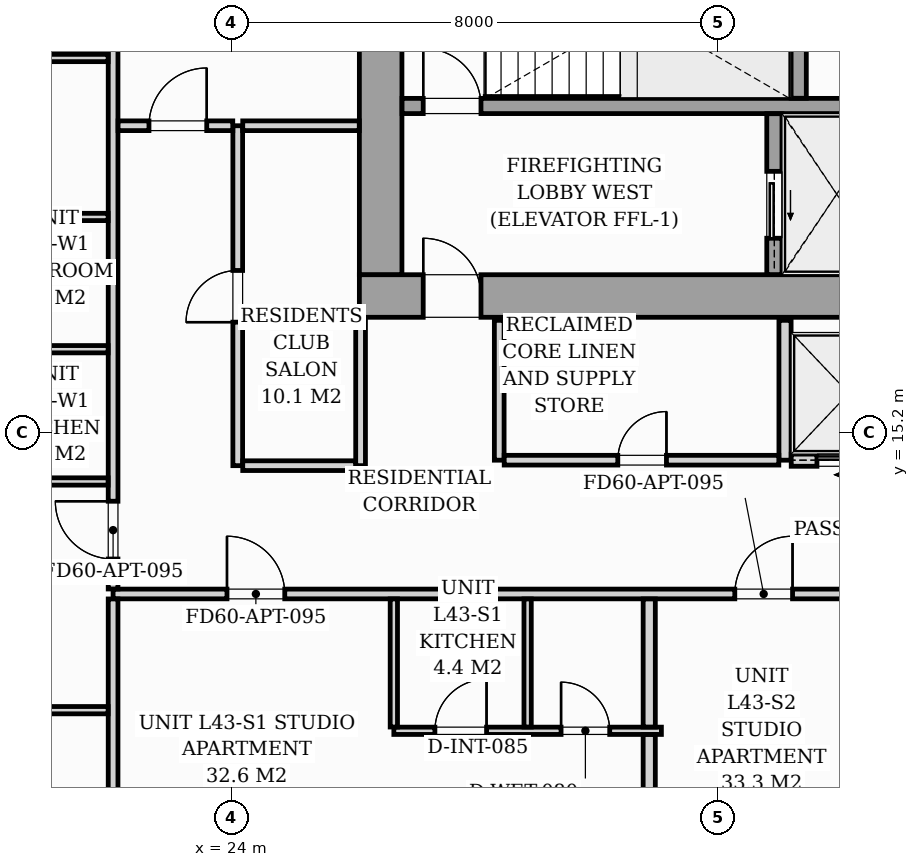
"""IFC4 building model, lengths in metres.
Left out: names, types, materials, properties, quantities, classifications, styles, units other than length and angle.
Written with IfcOpenShell. Run it as: python <this file> out.ifc"""

import sys

from ifc_helpers import new_model, si_unit, direction, frame, frame_2d, origin, origin_2d, place, context, subcontext, project, spatial, rectangle, i_section, extrude, source, transform, mapped, element, fill, save


model = new_model("IFC4")
c1 = context("Model", 3, precision=1e-05, world=origin(), true_north=direction((0.0, 1.0)))
c2 = subcontext(c1, "Body", "Model", "MODEL_VIEW")
j1 = project(units=[si_unit("LENGTHUNIT", "METRE"), si_unit("PLANEANGLEUNIT", "RADIAN")], contexts=[c1])
p1 = place(None, origin())
s1 = spatial("IfcSite", under=j1, at=p1, CompositionType="ELEMENT")
p2 = place(p1, origin())
s2 = spatial("IfcBuilding", under=s1, at=p2, CompositionType="ELEMENT")
p3 = place(p2, frame((0.0, 0.0, 150.2)))
s3 = spatial("IfcBuildingStorey", under=s2, at=p3, CompositionType="ELEMENT", Elevation=150.2)
m1 = source(origin(), c2, "Body", "SweptSolid", [
    extrude(i_section(OverallWidth=0.421, OverallDepth=0.465, WebThickness=0.045, FlangeThickness=0.073, FilletRadius=0.018, at=origin_2d()), origin(), (0.0, 0.0, 1.0), 3.196),
])
for number, where, z_axis, x_axis in (
    (1, (26.4, 17.4, 0.002), (0.0, 0.0, 1.0), (1.0, 0.0, 0.0)),
    (2, (33.12, 17.4, 0.002), (0.0, 0.0, 1.0), (1.0, 0.0, 0.0)),
):
    element("IfcColumn", number, at=place(p3, frame(where, z_axis=z_axis, x_axis=x_axis)), inside=s3, PredefinedType="PILASTER", context=c2, shape_type="MappedRepresentation", body=[
        mapped(m1, transform((0.0, 0.0, 0.0), scale=1.0)),
    ])
p4 = place(p3, frame((24.617, 7.873, 0.0), z_axis=(0.0, 0.0, 1.0), x_axis=(-0.995395976631, 0.095848055311, 0.0)))
e3 = element("IfcWall", 3, at=p4, inside=s3, PredefinedType="STANDARD", context=c2, shape_type="SweptSolid", body=[
    extrude(rectangle(XDim=17.01, YDim=0.26, at=frame_2d((8.505, 0.0))), origin(), (0.0, 0.0, 1.0), 2.94),
])
p5 = place(p4, frame((6.65, 0.0, 0.0)))
e4 = element("IfcOpeningElement", 4, at=p5, cuts=e3, PredefinedType="OPENING", context=c2, shape_type="SweptSolid", body=[
    extrude(rectangle(XDim=1.8, YDim=2.06, at=frame_2d((0.9, 1.03))), frame((0.0, 0.14, 0.0), z_axis=(0.0, -1.0, 0.0), x_axis=(1.0, 0.0, 0.0)), (0.0, 0.0, 1.0), 0.28),
])
p6 = place(p4, frame((9.25, 0.0, 0.65)))
e5 = element("IfcOpeningElement", 5, at=p6, cuts=e3, PredefinedType="OPENING", context=c2, shape_type="SweptSolid", body=[
    extrude(rectangle(XDim=1.6, YDim=1.5, at=frame_2d((0.8, 0.75))), frame((0.0, 0.14, 0.0), z_axis=(0.0, -1.0, 0.0), x_axis=(1.0, 0.0, 0.0)), (0.0, 0.0, 1.0), 0.28),
])
p7 = place(p3, frame((26.1, 17.45, 0.0), z_axis=(0.0, 0.0, 1.0), x_axis=(1.0, 0.0, 0.0)))
e6 = element("IfcWall", 6, at=p7, inside=s3, PredefinedType="SHEAR", context=c2, shape_type="SweptSolid", body=[
    extrude(rectangle(XDim=19.8, YDim=0.7, at=frame_2d((9.9, 0.0))), origin(), (0.0, 0.0, 1.0), 3.2),
])
p8 = place(p7, frame((1.05, 0.0, 0.0)))
e7 = element("IfcOpeningElement", 7, at=p8, cuts=e6, PredefinedType="OPENING", context=c2, shape_type="SweptSolid", body=[
    extrude(rectangle(XDim=0.95, YDim=2.06, at=frame_2d((0.475, 1.03))), frame((0.0, 0.36, 0.0), z_axis=(0.0, -1.0, 0.0), x_axis=(1.0, 0.0, 0.0)), (0.0, 0.0, 1.0), 0.72),
])
p9 = place(p7, frame((9.48, 0.0, 0.0)))
e8 = element("IfcOpeningElement", 8, at=p9, cuts=e6, PredefinedType="OPENING", context=c2, shape_type="SweptSolid", body=[
    extrude(rectangle(XDim=0.85, YDim=2.0, at=frame_2d((0.425, 1.0))), frame((0.0, 0.36, 0.0), z_axis=(0.0, -1.0, 0.0), x_axis=(1.0, 0.0, 0.0)), (0.0, 0.0, 1.0), 0.72),
])
p10 = place(p7, frame((17.65, 0.0, 0.0)))
e9 = element("IfcOpeningElement", 9, at=p10, cuts=e6, PredefinedType="OPENING", context=c2, shape_type="SweptSolid", body=[
    extrude(rectangle(XDim=0.95, YDim=2.06, at=frame_2d((0.475, 1.03))), frame((0.0, 0.36, 0.0), z_axis=(0.0, -1.0, 0.0), x_axis=(1.0, 0.0, 0.0)), (0.0, 0.0, 1.0), 0.72),
])
p11 = place(p3, frame((26.45, 17.802, 0.0), z_axis=(0.0, 0.0, 1.0), x_axis=(0.0, 1.0, 0.0)))
e10 = element("IfcWall", 10, at=p11, inside=s3, PredefinedType="SHEAR", context=c2, shape_type="SweptSolid", body=[
    extrude(rectangle(XDim=5.796, YDim=0.7, at=frame_2d((2.898, 0.0))), origin(), (0.0, 0.0, 1.0), 3.2),
])
p12 = place(p3, frame((26.802, 20.575, 0.0), z_axis=(0.0, 0.0, 1.0), x_axis=(1.0, 0.0, 0.0)))
e11 = element("IfcWall", 11, at=p12, inside=s3, PredefinedType="SOLIDWALL", context=c2, shape_type="SweptSolid", body=[
    extrude(rectangle(XDim=8.148, YDim=0.25, at=frame_2d((4.074, 0.0))), origin(), (0.0, 0.0, 1.0), 3.2),
])
p13 = place(p12, frame((0.348, 0.0, 0.0)))
e12 = element("IfcOpeningElement", 12, at=p13, cuts=e11, PredefinedType="OPENING", context=c2, shape_type="SweptSolid", body=[
    extrude(rectangle(XDim=0.95, YDim=2.06, at=frame_2d((0.475, 1.03))), frame((0.0, 0.135, 0.0), z_axis=(0.0, -1.0, 0.0), x_axis=(1.0, 0.0, 0.0)), (0.0, 0.0, 1.0), 0.27),
])
p14 = place(p3, frame((33.325, 20.702, 0.0), z_axis=(0.0, 0.0, 1.0), x_axis=(0.0, 1.0, 0.0)))
e13 = element("IfcWall", 13, at=p14, inside=s3, PredefinedType="SOLIDWALL", context=c2, shape_type="SweptSolid", body=[
    extrude(rectangle(XDim=2.896, YDim=0.25, at=frame_2d((1.448, 0.0))), origin(), (0.0, 0.0, 1.0), 3.2),
])
p15 = place(p3, frame((32.925, 17.802, 0.0), z_axis=(0.0, 0.0, 1.0), x_axis=(0.0, 1.0, 0.0)))
e14 = element("IfcWall", 14, at=p15, inside=s3, PredefinedType="SOLIDWALL", context=c2, shape_type="SweptSolid", body=[
    extrude(rectangle(XDim=2.646, YDim=0.25, at=frame_2d((1.323, 0.0))), origin(), (0.0, 0.0, 1.0), 3.2),
])
p16 = place(p15, frame((0.598, 0.0, 0.0)))
e15 = element("IfcOpeningElement", 15, at=p16, cuts=e14, PredefinedType="OPENING", context=c2, shape_type="SweptSolid", body=[
    extrude(rectangle(XDim=1.1, YDim=2.08, at=frame_2d((0.55, 1.04))), frame((0.0, 0.135, 0.0), z_axis=(0.0, -1.0, 0.0), x_axis=(1.0, 0.0, 0.0)), (0.0, 0.0, 1.0), 0.27),
])
p17 = place(p3, frame((28.4, 14.75, 0.0), z_axis=(0.0, 0.0, 1.0), x_axis=(0.0, 1.0, 0.0)))
e16 = element("IfcWall", 16, at=p17, inside=s3, PredefinedType="PARTITIONING", context=c2, shape_type="SweptSolid", body=[
    extrude(rectangle(XDim=2.3, YDim=0.16, at=frame_2d((1.15, 0.0))), origin(), (0.0, 0.0, 1.0), 2.94),
])
p18 = place(p3, frame((33.1, 14.75, 0.0), z_axis=(0.0, 0.0, 1.0), x_axis=(0.0, 1.0, 0.0)))
e17 = element("IfcWall", 17, at=p18, inside=s3, PredefinedType="PARTITIONING", context=c2, shape_type="SweptSolid", body=[
    extrude(rectangle(XDim=2.3, YDim=0.2, at=frame_2d((1.15, 0.0))), origin(), (0.0, 0.0, 1.0), 2.94),
])
p19 = place(p3, frame((28.482, 14.75, 0.0), z_axis=(0.0, 0.0, 1.0), x_axis=(1.0, 0.0, 0.0)))
e18 = element("IfcWall", 18, at=p19, inside=s3, PredefinedType="PARTITIONING", context=c2, shape_type="SweptSolid", body=[
    extrude(rectangle(XDim=4.516, YDim=0.16, at=frame_2d((2.258, 0.0))), origin(), (0.0, 0.0, 1.0), 2.94),
])
p20 = place(p19, frame((1.868, 0.0, 0.0)))
e19 = element("IfcOpeningElement", 19, at=p20, cuts=e18, PredefinedType="OPENING", context=c2, shape_type="SweptSolid", body=[
    extrude(rectangle(XDim=0.8, YDim=2.05, at=frame_2d((0.4, 1.025))), frame((0.0, 0.09, 0.0), z_axis=(0.0, -1.0, 0.0), x_axis=(1.0, 0.0, 0.0)), (0.0, 0.0, 1.0), 0.18),
])
p21 = place(p3, frame((33.202, 14.75, 0.0), z_axis=(0.0, 0.0, 1.0), x_axis=(1.0, 0.0, 0.0)))
e20 = element("IfcWall", 20, at=p21, inside=s3, PredefinedType="PARTITIONING", context=c2, shape_type="SweptSolid", body=[
    extrude(rectangle(XDim=1.896, YDim=0.2, at=frame_2d((0.948, 0.0))), origin(), (0.0, 0.0, 1.0), 2.94),
])
p22 = place(p21, frame((0.423, 0.0, 0.0)))
e21 = element("IfcOpeningElement", 21, at=p22, cuts=e20, PredefinedType="OPENING", context=c2, shape_type="SweptSolid", body=[
    extrude(rectangle(XDim=1.05, YDim=2.08, at=frame_2d((0.525, 1.04))), frame((0.0, 0.11, 0.0), z_axis=(0.0, -1.0, 0.0), x_axis=(1.0, 0.0, 0.0)), (0.0, 0.0, 1.0), 0.22),
])
p23 = place(p3, frame((22.05, 12.55, 0.0), z_axis=(0.0, 0.0, 1.0), x_axis=(1.0, 0.0, 0.0)))
e22 = element("IfcWall", 22, at=p23, inside=s3, PredefinedType="PARTITIONING", context=c2, shape_type="SweptSolid", body=[
    extrude(rectangle(XDim=23.83, YDim=0.16, at=frame_2d((11.915, 0.0))), origin(), (0.0, 0.0, 1.0), 2.94),
])
p24 = place(p23, frame((1.873, 0.0, 0.0)))
e23 = element("IfcOpeningElement", 23, at=p24, cuts=e22, PredefinedType="OPENING", context=c2, shape_type="SweptSolid", body=[
    extrude(rectangle(XDim=0.95, YDim=2.06, at=frame_2d((0.475, 1.03))), frame((0.0, 0.09, 0.0), z_axis=(0.0, -1.0, 0.0), x_axis=(1.0, 0.0, 0.0)), (0.0, 0.0, 1.0), 0.18),
])
p25 = place(p23, frame((10.224, 0.0, 0.0)))
e24 = element("IfcOpeningElement", 24, at=p25, cuts=e22, PredefinedType="OPENING", context=c2, shape_type="SweptSolid", body=[
    extrude(rectangle(XDim=0.95, YDim=2.06, at=frame_2d((0.475, 1.03))), frame((0.0, 0.09, 0.0), z_axis=(0.0, -1.0, 0.0), x_axis=(1.0, 0.0, 0.0)), (0.0, 0.0, 1.0), 0.18),
])
p26 = place(p23, frame((21.84, 0.0, 0.0)))
e25 = element("IfcOpeningElement", 25, at=p26, cuts=e22, PredefinedType="OPENING", context=c2, shape_type="SweptSolid", body=[
    extrude(rectangle(XDim=0.95, YDim=2.06, at=frame_2d((0.475, 1.03))), frame((0.0, 0.09, 0.0), z_axis=(0.0, -1.0, 0.0), x_axis=(1.0, 0.0, 0.0)), (0.0, 0.0, 1.0), 0.18),
])
p27 = place(p3, frame((22.05, 8.253, 0.0), z_axis=(0.0, 0.0, 1.0), x_axis=(0.0, 1.0, 0.0)))
e26 = element("IfcWall", 26, at=p27, inside=s3, PredefinedType="PARTITIONING", context=c2, shape_type="SweptSolid", body=[
    extrude(rectangle(XDim=4.215, YDim=0.16, at=frame_2d((2.107, 0.0))), origin(), (0.0, 0.0, 1.0), 2.94),
])
p28 = place(p3, frame((22.05, 12.632, 0.0), z_axis=(0.0, 0.0, 1.0), x_axis=(0.0, 1.0, 0.0)))
e27 = element("IfcWall", 27, at=p28, inside=s3, PredefinedType="PARTITIONING", context=c2, shape_type="SweptSolid", body=[
    extrude(rectangle(XDim=14.785, YDim=0.16, at=frame_2d((7.393, 0.0))), origin(), (0.0, 0.0, 1.0), 2.94),
])
p29 = place(p28, frame((0.493, 0.0, 0.0)))
e28 = element("IfcOpeningElement", 28, at=p29, cuts=e27, PredefinedType="OPENING", context=c2, shape_type="SweptSolid", body=[
    extrude(rectangle(XDim=0.95, YDim=2.06, at=frame_2d((0.475, 1.03))), frame((0.0, 0.09, 0.0), z_axis=(0.0, -1.0, 0.0), x_axis=(1.0, 0.0, 0.0)), (0.0, 0.0, 1.0), 0.18),
])
p30 = place(p3, frame((26.667, 10.3, 0.0), z_axis=(0.0, 0.0, 1.0), x_axis=(1.0, 0.0, 0.0)))
e29 = element("IfcWall", 29, at=p30, inside=s3, PredefinedType="PARTITIONING", context=c2, shape_type="SweptSolid", body=[
    extrude(rectangle(XDim=4.4, YDim=0.12, at=frame_2d((2.2, 0.0))), origin(), (0.0, 0.0, 1.0), 2.94),
])
p31 = place(p30, frame((0.675, 0.0, 0.0)))
e30 = element("IfcOpeningElement", 30, at=p31, cuts=e29, PredefinedType="OPENING", context=c2, shape_type="SweptSolid", body=[
    extrude(rectangle(XDim=0.85, YDim=2.05, at=frame_2d((0.425, 1.025))), frame((0.0, 0.07, 0.0), z_axis=(0.0, -1.0, 0.0), x_axis=(1.0, 0.0, 0.0)), (0.0, 0.0, 1.0), 0.14),
])
p32 = place(p30, frame((2.75, 0.0, 0.0)))
e31 = element("IfcOpeningElement", 31, at=p32, cuts=e29, PredefinedType="OPENING", context=c2, shape_type="SweptSolid", body=[
    extrude(rectangle(XDim=0.8, YDim=2.02, at=frame_2d((0.4, 1.01))), frame((0.0, 0.07, 0.0), z_axis=(0.0, -1.0, 0.0), x_axis=(1.0, 0.0, 0.0)), (0.0, 0.0, 1.0), 0.14),
])
for number, where, z_axis, x_axis in (
    (32, (26.667, 10.362, 0.0), (0.0, 0.0, 1.0), (0.0, 1.0, 0.0)),
    (33, (28.867, 10.362, 0.0), (0.0, 0.0, 1.0), (0.0, 1.0, 0.0)),
):
    element("IfcWall", number, at=place(p3, frame(where, z_axis=z_axis, x_axis=x_axis)), inside=s3, PredefinedType="PARTITIONING", context=c2, shape_type="SweptSolid", body=[
        extrude(rectangle(XDim=2.106, YDim=0.12, at=frame_2d((1.053, 0.0))), origin(), (0.0, 0.0, 1.0), 2.94),
    ])
p33 = place(p3, frame((30.867, 7.221, 0.0), z_axis=(0.0, 0.0, 1.0), x_axis=(0.0, 1.0, 0.0)))
e34 = element("IfcWall", 34, at=p33, inside=s3, PredefinedType="PARTITIONING", context=c2, shape_type="SweptSolid", body=[
    extrude(rectangle(XDim=3.017, YDim=0.2, at=frame_2d((1.508, 0.0))), origin(), (0.0, 0.0, 1.0), 2.94),
])
p34 = place(p3, frame((30.867, 10.362, 0.0), z_axis=(0.0, 0.0, 1.0), x_axis=(0.0, 1.0, 0.0)))
e35 = element("IfcWall", 35, at=p34, inside=s3, PredefinedType="PARTITIONING", context=c2, shape_type="SweptSolid", body=[
    extrude(rectangle(XDim=2.106, YDim=0.2, at=frame_2d((1.053, 0.0))), origin(), (0.0, 0.0, 1.0), 2.94),
])
for number, where, z_axis, x_axis in (
    (36, (19.712, 16.575, 0.0), (0.0, 0.0, 1.0), (1.0, 0.0, 0.0)),
    (37, (19.712, 14.4, 0.0), (0.0, 0.0, 1.0), (1.0, 0.0, 0.0)),
    (38, (19.712, 18.75, 0.0), (0.0, 0.0, 1.0), (1.0, 0.0, 0.0)),
):
    element("IfcWall", number, at=place(p3, frame(where, z_axis=z_axis, x_axis=x_axis)), inside=s3, PredefinedType="PARTITIONING", context=c2, shape_type="SweptSolid", body=[
        extrude(rectangle(XDim=2.256, YDim=0.12, at=frame_2d((1.128, 0.0))), origin(), (0.0, 0.0, 1.0), 2.94),
    ])
p35 = place(p3, frame((6.396, 21.364, 0.0), z_axis=(0.0, 0.0, 1.0), x_axis=(1.0, 0.0, 0.0)))
e39 = element("IfcWall", 39, at=p35, inside=s3, PredefinedType="PARTITIONING", context=c2, shape_type="SweptSolid", body=[
    extrude(rectangle(XDim=15.572, YDim=0.12, at=frame_2d((7.786, 0.0))), origin(), (0.0, 0.0, 1.0), 2.94),
])
p36 = place(p35, frame((9.45, 0.0, 0.0)))
e40 = element("IfcOpeningElement", 40, at=p36, cuts=e39, PredefinedType="OPENING", context=c2, shape_type="SweptSolid", body=[
    extrude(rectangle(XDim=0.85, YDim=2.05, at=frame_2d((0.425, 1.025))), frame((0.0, 0.07, 0.0), z_axis=(0.0, -1.0, 0.0), x_axis=(1.0, 0.0, 0.0)), (0.0, 0.0, 1.0), 0.14),
])
p37 = place(p3, frame((8.395, 10.639, 0.0), z_axis=(0.0, 0.0, 1.0), x_axis=(1.0, 0.0, 0.0)))
e41 = element("IfcWall", 41, at=p37, inside=s3, PredefinedType="PARTITIONING", context=c2, shape_type="SweptSolid", body=[
    extrude(rectangle(XDim=13.573, YDim=0.12, at=frame_2d((6.787, 0.0))), origin(), (0.0, 0.0, 1.0), 2.94),
])
p38 = place(p37, frame((7.451, 0.0, 0.0)))
e42 = element("IfcOpeningElement", 42, at=p38, cuts=e41, PredefinedType="OPENING", context=c2, shape_type="SweptSolid", body=[
    extrude(rectangle(XDim=0.85, YDim=2.05, at=frame_2d((0.425, 1.025))), frame((0.0, 0.07, 0.0), z_axis=(0.0, -1.0, 0.0), x_axis=(1.0, 0.0, 0.0)), (0.0, 0.0, 1.0), 0.14),
])
p39 = place(p3, frame((24.1, 14.66, 0.0), z_axis=(0.0, 0.0, 1.0), x_axis=(0.0, 1.0, 0.0)))
e43 = element("IfcWall", 43, at=p39, inside=s3, PredefinedType="PARTITIONING", context=c2, shape_type="SweptSolid", body=[
    extrude(rectangle(XDim=5.59, YDim=0.16, at=frame_2d((2.795, 0.0))), origin(), (0.0, 0.0, 1.0), 2.94),
])
p40 = place(p39, frame((2.36, 0.0, 0.0)))
e44 = element("IfcOpeningElement", 44, at=p40, cuts=e43, PredefinedType="OPENING", context=c2, shape_type="SweptSolid", body=[
    extrude(rectangle(XDim=0.85, YDim=2.0, at=frame_2d((0.425, 1.0))), frame((0.0, 0.09, 0.0), z_axis=(0.0, -1.0, 0.0), x_axis=(1.0, 0.0, 0.0)), (0.0, 0.0, 1.0), 0.18),
])
p41 = place(p3, frame((22.132, 20.25, 0.0), z_axis=(0.0, 0.0, 1.0), x_axis=(1.0, 0.0, 0.0)))
e45 = element("IfcWall", 45, at=p41, inside=s3, PredefinedType="PARTITIONING", context=c2, shape_type="SweptSolid", body=[
    extrude(rectangle(XDim=1.886, YDim=0.16, at=frame_2d((0.943, 0.0))), origin(), (0.0, 0.0, 1.0), 2.94),
])
p42 = place(p41, frame((0.508, 0.0, 0.0)))
e46 = element("IfcOpeningElement", 46, at=p42, cuts=e45, PredefinedType="OPENING", context=c2, shape_type="SweptSolid", body=[
    extrude(rectangle(XDim=0.95, YDim=2.06, at=frame_2d((0.475, 1.03))), frame((0.0, 0.09, 0.0), z_axis=(0.0, -1.0, 0.0), x_axis=(1.0, 0.0, 0.0)), (0.0, 0.0, 1.0), 0.18),
])
p43 = place(p3, frame((24.182, 20.25, 0.0), z_axis=(0.0, 0.0, 1.0), x_axis=(1.0, 0.0, 0.0)))
e47 = element("IfcWall", 47, at=p43, inside=s3, PredefinedType="PARTITIONING", context=c2, shape_type="SweptSolid", body=[
    extrude(rectangle(XDim=1.916, YDim=0.16, at=frame_2d((0.958, 0.0))), origin(), (0.0, 0.0, 1.0), 2.94),
])
p44 = place(p3, frame((26.12, 14.66, 0.0), z_axis=(0.0, 0.0, 1.0), x_axis=(0.0, 1.0, 0.0)))
e48 = element("IfcWall", 48, at=p44, inside=s3, PredefinedType="PARTITIONING", context=c2, shape_type="SweptSolid", body=[
    extrude(rectangle(XDim=2.438, YDim=0.16, at=frame_2d((1.219, 0.0))), origin(), (0.0, 0.0, 1.0), 2.94),
])
p45 = place(p3, frame((24.182, 14.66, 0.0), z_axis=(0.0, 0.0, 1.0), x_axis=(1.0, 0.0, 0.0)))
e49 = element("IfcWall", 49, at=p45, inside=s3, PredefinedType="PARTITIONING", context=c2, shape_type="SweptSolid", body=[
    extrude(rectangle(XDim=1.856, YDim=0.16, at=frame_2d((0.928, 0.0))), origin(), (0.0, 0.0, 1.0), 2.94),
])
m2 = source(origin(), c2, "Body", "SweptSolid", [
    extrude(rectangle(XDim=0.95, YDim=2.06, at=frame_2d((0.475, 1.03))), frame((0.0, 0.025, 0.0), z_axis=(0.0, -1.0, 0.0), x_axis=(1.0, 0.0, 0.0)), (0.0, 0.0, 1.0), 0.05),
])
p46 = place(p8, origin())
e50 = element("IfcDoor", 50, at=p46, inside=s3, OperationType="SINGLE_SWING_LEFT", PredefinedType="DOOR", context=c2, shape_type="MappedRepresentation", body=[
    mapped(m2, transform((0.0, 0.0, 0.0), scale=1.0)),
])
fill(e7, e50)
p47 = place(p13, origin())
e51 = element("IfcDoor", 51, at=p47, inside=s3, OperationType="SINGLE_SWING_LEFT", PredefinedType="DOOR", context=c2, shape_type="MappedRepresentation", body=[
    mapped(m2, transform((0.0, 0.0, 0.0), scale=1.0)),
])
fill(e12, e51)
m3 = source(origin(), c2, "Body", "SweptSolid", [
    extrude(rectangle(XDim=1.1, YDim=2.08, at=frame_2d((0.55, 1.04))), frame((0.0, 0.025, 0.0), z_axis=(0.0, -1.0, 0.0), x_axis=(1.0, 0.0, 0.0)), (0.0, 0.0, 1.0), 0.05),
])
p48 = place(p16, origin())
e52 = element("IfcDoor", 52, at=p48, inside=s3, OperationType="SLIDING_TO_LEFT", PredefinedType="DOOR", context=c2, shape_type="MappedRepresentation", body=[
    mapped(m3, transform((0.0, 0.0, 0.0), scale=1.0)),
])
fill(e15, e52)
m4 = source(origin(), c2, "Body", "SweptSolid", [
    extrude(rectangle(XDim=0.8, YDim=2.05, at=frame_2d((0.4, 1.025))), frame((0.0, 0.025, 0.0), z_axis=(0.0, -1.0, 0.0), x_axis=(1.0, 0.0, 0.0)), (0.0, 0.0, 1.0), 0.05),
])
p49 = place(p20, origin())
e53 = element("IfcDoor", 53, at=p49, inside=s3, OperationType="SINGLE_SWING_RIGHT", PredefinedType="DOOR", context=c2, shape_type="MappedRepresentation", body=[
    mapped(m4, transform((0.0, 0.0, 0.0), scale=1.0)),
])
fill(e19, e53)
m5 = source(origin(), c2, "Body", "SweptSolid", [
    extrude(rectangle(XDim=1.05, YDim=2.08, at=frame_2d((0.525, 1.04))), frame((0.0, 0.025, 0.0), z_axis=(0.0, -1.0, 0.0), x_axis=(1.0, 0.0, 0.0)), (0.0, 0.0, 1.0), 0.05),
])
p50 = place(p22, origin())
e54 = element("IfcDoor", 54, at=p50, inside=s3, OperationType="SLIDING_TO_LEFT", PredefinedType="DOOR", context=c2, shape_type="MappedRepresentation", body=[
    mapped(m5, transform((0.0, 0.0, 0.0), scale=1.0)),
])
fill(e21, e54)
m6 = source(origin(), c2, "Body", "SweptSolid", [
    extrude(rectangle(XDim=0.95, YDim=2.06, at=frame_2d((0.475, 1.03))), frame((0.0, 0.025, 0.0), z_axis=(0.0, -1.0, 0.0), x_axis=(1.0, 0.0, 0.0)), (0.0, 0.0, 1.0), 0.05),
])
p51 = place(p24, origin())
e55 = element("IfcDoor", 55, at=p51, inside=s3, OperationType="SINGLE_SWING_LEFT", PredefinedType="DOOR", context=c2, shape_type="MappedRepresentation", body=[
    mapped(m6, transform((0.0, 0.0, 0.0), scale=1.0)),
])
fill(e23, e55)
m7 = source(origin(), c2, "Body", "SweptSolid", [
    extrude(rectangle(XDim=0.85, YDim=2.05, at=frame_2d((0.425, 1.025))), frame((0.0, 0.025, 0.0), z_axis=(0.0, -1.0, 0.0), x_axis=(1.0, 0.0, 0.0)), (0.0, 0.0, 1.0), 0.05),
])
p52 = place(p31, origin())
e56 = element("IfcDoor", 56, at=p52, inside=s3, OperationType="SINGLE_SWING_RIGHT", PredefinedType="DOOR", context=c2, shape_type="MappedRepresentation", body=[
    mapped(m7, transform((0.0, 0.0, 0.0), scale=1.0)),
])
fill(e30, e56)
m8 = source(origin(), c2, "Body", "SweptSolid", [
    extrude(rectangle(XDim=0.8, YDim=2.02, at=frame_2d((0.4, 1.01))), frame((0.0, 0.025, 0.0), z_axis=(0.0, -1.0, 0.0), x_axis=(1.0, 0.0, 0.0)), (0.0, 0.0, 1.0), 0.05),
])
p53 = place(p32, origin())
e57 = element("IfcDoor", 57, at=p53, inside=s3, OperationType="SINGLE_SWING_LEFT", PredefinedType="DOOR", context=c2, shape_type="MappedRepresentation", body=[
    mapped(m8, transform((0.0, 0.0, 0.0), scale=1.0)),
])
fill(e31, e57)
p54 = place(p25, origin())
e58 = element("IfcDoor", 58, at=p54, inside=s3, OperationType="SINGLE_SWING_RIGHT", PredefinedType="DOOR", context=c2, shape_type="MappedRepresentation", body=[
    mapped(m6, transform((0.0, 0.0, 0.0), scale=1.0)),
])
fill(e24, e58)
p55 = place(p29, origin())
e59 = element("IfcDoor", 59, at=p55, inside=s3, OperationType="SINGLE_SWING_RIGHT", PredefinedType="DOOR", context=c2, shape_type="MappedRepresentation", body=[
    mapped(m6, transform((0.0, 0.0, 0.0), scale=1.0)),
])
fill(e28, e59)
m9 = source(origin(), c2, "Body", "SweptSolid", [
    extrude(rectangle(XDim=0.85, YDim=2.0, at=frame_2d((0.425, 1.0))), frame((0.0, 0.025, 0.0), z_axis=(0.0, -1.0, 0.0), x_axis=(1.0, 0.0, 0.0)), (0.0, 0.0, 1.0), 0.05),
])
p56 = place(p40, origin())
e60 = element("IfcDoor", 60, at=p56, inside=s3, OperationType="SINGLE_SWING_LEFT", PredefinedType="DOOR", context=c2, shape_type="MappedRepresentation", body=[
    mapped(m9, transform((0.0, 0.0, 0.0), scale=1.0)),
])
fill(e44, e60)
p57 = place(p42, origin())
e61 = element("IfcDoor", 61, at=p57, inside=s3, OperationType="SINGLE_SWING_RIGHT", PredefinedType="DOOR", context=c2, shape_type="MappedRepresentation", body=[
    mapped(m6, transform((0.0, 0.0, 0.0), scale=1.0)),
])
fill(e46, e61)
save(model, sys.argv[1])
